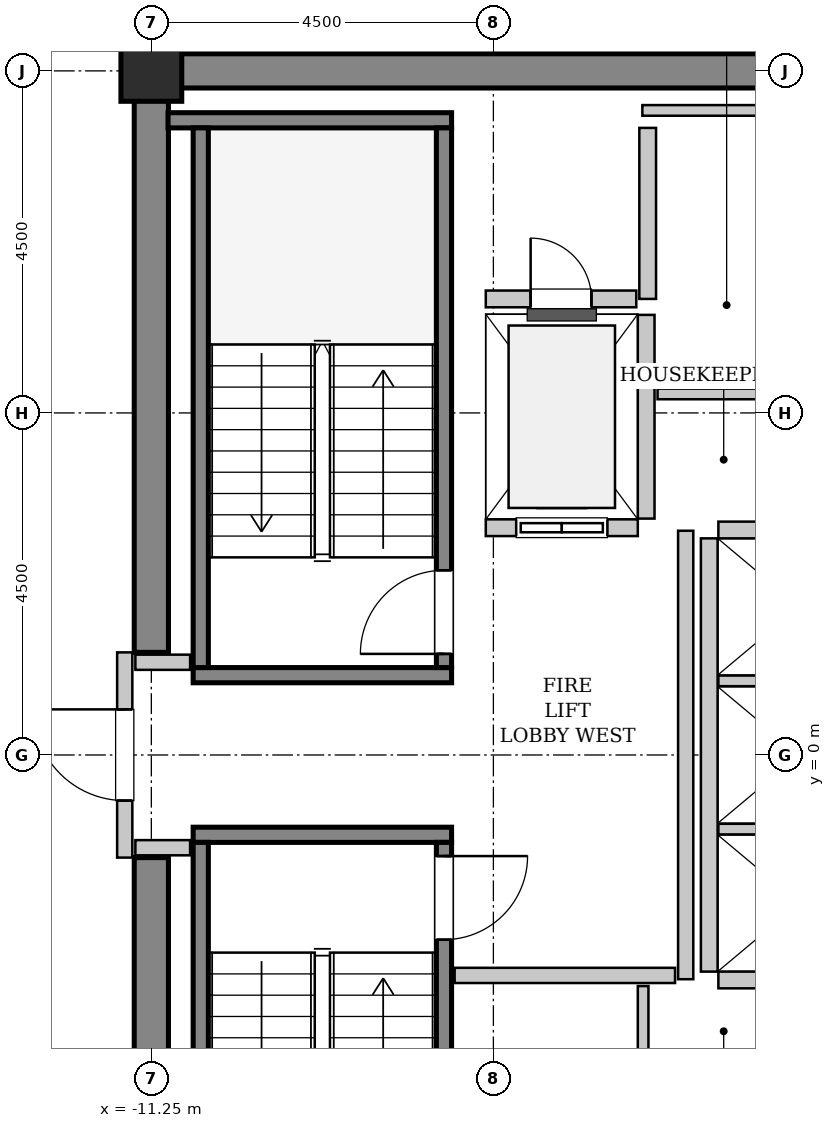
"""IFC4 building model, lengths in metres.
Left out: names, types, materials, properties, quantities, classifications, styles, units other than length and angle.
Written with IfcOpenShell. Run it as: python <this file> out.ifc"""

import sys

from ifc_helpers import new_model, si_unit, direction, frame, frame_2d, origin, origin_2d, place, context, subcontext, project, spatial, rectangle, hollow_rectangle, extrude, source, transform, mapped, element, fill, save


model = new_model("IFC4")
c1 = context("Model", 3, precision=1e-05, world=origin(), true_north=direction((0.0, 1.0)))
c2 = subcontext(c1, "Body", "Model", "MODEL_VIEW")
j1 = project(units=[si_unit("LENGTHUNIT", "METRE"), si_unit("PLANEANGLEUNIT", "RADIAN")], contexts=[c1])
p1 = place(None, origin())
s1 = spatial("IfcSite", under=j1, at=p1, CompositionType="ELEMENT")
p2 = place(p1, origin())
s2 = spatial("IfcBuilding", under=s1, at=p2, CompositionType="ELEMENT")
p3 = place(p2, frame((0.0, 0.0, 252.2)))
s3 = spatial("IfcBuildingStorey", under=s2, at=p3, CompositionType="ELEMENT", Elevation=252.2)
m1 = source(origin(), c2, "Body", "SweptSolid", [
    extrude(rectangle(XDim=9.925, YDim=0.45, at=frame_2d((4.962, 0.0))), origin(), (0.0, 0.0, 1.0), 3.8),
])
p4 = place(p3, frame((-11.475, 9.0, 0.0), z_axis=(0.0, 0.0, 1.0), x_axis=(1.0, 0.0, 0.0)))
e1 = element("IfcWall", 1, at=p4, inside=s3, PredefinedType="SHEAR", context=c2, shape_type="MappedRepresentation", body=[
    mapped(m1, transform((0.0, 0.0, 0.0), x_axis=(1.0, 0.0, 0.0), y_axis=(0.0, 1.0, 0.0), z_axis=(0.0, 0.0, 1.0), scale=1.0)),
])
m2 = source(origin(), c2, "Body", "SweptSolid", [
    extrude(rectangle(XDim=7.425, YDim=0.45, at=frame_2d((3.712, 0.0))), origin(), (0.0, 0.0, 1.0), 3.8),
])
for number, where, z_axis, x_axis in (
    (2, (-11.25, -8.775, 0.0), (0.0, 0.0, 1.0), (0.0, 1.0, 0.0)),
    (3, (-11.25, 1.35, 0.0), (0.0, 0.0, 1.0), (0.0, 1.0, 0.0)),
):
    element("IfcWall", number, at=place(p3, frame(where, z_axis=z_axis, x_axis=x_axis)), inside=s3, PredefinedType="SHEAR", context=c2, shape_type="MappedRepresentation", body=[
        mapped(m2, transform((0.0, 0.0, 0.0), x_axis=(1.0, 0.0, 0.0), y_axis=(0.0, 1.0, 0.0), z_axis=(0.0, 0.0, 1.0), scale=1.0)),
    ])
m3 = source(origin(), c2, "Body", "SweptSolid", [
    extrude(hollow_rectangle(XDim=0.8, YDim=0.8, WallThickness=0.04, InnerFilletRadius=0.04, OuterFilletRadius=0.08, at=origin_2d()), origin(), (0.0, 0.0, 1.0), 3.8),
])
p5 = place(p3, frame((-11.25, 9.0, 0.0), z_axis=(0.0, 0.0, 1.0), x_axis=(1.0, 0.0, 0.0)))
e4 = element("IfcColumn", 4, at=p5, inside=s3, PredefinedType="COLUMN", context=c2, shape_type="MappedRepresentation", body=[
    mapped(m3, transform((0.0, 0.0, 0.0), x_axis=(1.0, 0.0, 0.0), y_axis=(0.0, 1.0, 0.0), z_axis=(0.0, 0.0, 1.0), scale=1.0)),
])
m4 = source(origin(), c2, "Body", "SweptSolid", [
    extrude(rectangle(XDim=3.4, YDim=0.2, at=frame_2d((1.7, 0.0))), origin(), (0.0, 0.0, 1.0), 3.8),
])
p6 = place(p3, frame((-7.3, 1.05, 0.0), z_axis=(0.0, 0.0, 1.0), x_axis=(-1.0, 0.0, 0.0)))
e5 = element("IfcWall", 5, at=p6, inside=s3, PredefinedType="SOLIDWALL", context=c2, shape_type="MappedRepresentation", body=[
    mapped(m4, transform((0.0, 0.0, 0.0), x_axis=(1.0, 0.0, 0.0), y_axis=(0.0, 1.0, 0.0), z_axis=(0.0, 0.0, 1.0), scale=1.0)),
])
m5 = source(origin(), c2, "Body", "SweptSolid", [
    extrude(rectangle(XDim=3.73, YDim=0.2, at=frame_2d((1.865, 0.0))), origin(), (0.0, 0.0, 1.0), 3.8),
])
p7 = place(p3, frame((-7.3, 8.35, 0.0), z_axis=(0.0, 0.0, 1.0), x_axis=(-1.0, 0.0, 0.0)))
e6 = element("IfcWall", 6, at=p7, inside=s3, PredefinedType="SOLIDWALL", context=c2, shape_type="MappedRepresentation", body=[
    mapped(m5, transform((0.0, 0.0, 0.0), x_axis=(1.0, 0.0, 0.0), y_axis=(0.0, 1.0, 0.0), z_axis=(0.0, 0.0, 1.0), scale=1.0)),
])
m6 = source(origin(), c2, "Body", "SweptSolid", [
    extrude(rectangle(XDim=7.1, YDim=0.2, at=frame_2d((3.55, 0.0))), origin(), (0.0, 0.0, 1.0), 3.8),
])
p8 = place(p3, frame((-7.4, 1.15, 0.0), z_axis=(0.0, 0.0, 1.0), x_axis=(0.0, 1.0, 0.0)))
e7 = element("IfcWall", 7, at=p8, inside=s3, PredefinedType="SOLIDWALL", context=c2, shape_type="MappedRepresentation", body=[
    mapped(m6, transform((0.0, 0.0, 0.0), x_axis=(1.0, 0.0, 0.0), y_axis=(0.0, 1.0, 0.0), z_axis=(0.0, 0.0, 1.0), scale=1.0)),
])
p9 = place(p8, frame((0.18, 0.0, 0.0)))
e8 = element("IfcOpeningElement", 8, at=p9, cuts=e7, PredefinedType="OPENING", context=c2, shape_type="SweptSolid", body=[
    extrude(rectangle(XDim=1.1, YDim=2.15, at=frame_2d((0.55, 1.075))), frame((0.0, 0.11, 0.0), z_axis=(0.0, -1.0, 0.0), x_axis=(1.0, 0.0, 0.0)), (0.0, 0.0, 1.0), 0.22),
])
p10 = place(p3, frame((-10.6, 1.15, 0.0), z_axis=(0.0, 0.0, 1.0), x_axis=(0.0, 1.0, 0.0)))
e9 = element("IfcWall", 9, at=p10, inside=s3, PredefinedType="SOLIDWALL", context=c2, shape_type="MappedRepresentation", body=[
    mapped(m6, transform((0.0, 0.0, 0.0), x_axis=(1.0, 0.0, 0.0), y_axis=(0.0, 1.0, 0.0), z_axis=(0.0, 0.0, 1.0), scale=1.0)),
])
p11 = place(p3, frame((-10.7, -1.05, 0.0), z_axis=(0.0, 0.0, 1.0), x_axis=(1.0, 0.0, 0.0)))
e10 = element("IfcWall", 10, at=p11, inside=s3, PredefinedType="SOLIDWALL", context=c2, shape_type="MappedRepresentation", body=[
    mapped(m4, transform((0.0, 0.0, 0.0), x_axis=(1.0, 0.0, 0.0), y_axis=(0.0, 1.0, 0.0), z_axis=(0.0, 0.0, 1.0), scale=1.0)),
])
p12 = place(p3, frame((-10.6, -1.15, 0.0), z_axis=(0.0, 0.0, 1.0), x_axis=(0.0, -1.0, 0.0)))
e11 = element("IfcWall", 11, at=p12, inside=s3, PredefinedType="SOLIDWALL", context=c2, shape_type="MappedRepresentation", body=[
    mapped(m6, transform((0.0, 0.0, 0.0), x_axis=(1.0, 0.0, 0.0), y_axis=(0.0, 1.0, 0.0), z_axis=(0.0, 0.0, 1.0), scale=1.0)),
])
p13 = place(p3, frame((-7.4, -1.15, 0.0), z_axis=(0.0, 0.0, 1.0), x_axis=(0.0, -1.0, 0.0)))
e12 = element("IfcWall", 12, at=p13, inside=s3, PredefinedType="SOLIDWALL", context=c2, shape_type="MappedRepresentation", body=[
    mapped(m6, transform((0.0, 0.0, 0.0), x_axis=(1.0, 0.0, 0.0), y_axis=(0.0, 1.0, 0.0), z_axis=(0.0, 0.0, 1.0), scale=1.0)),
])
p14 = place(p13, frame((0.18, 0.0, 0.0)))
e13 = element("IfcOpeningElement", 13, at=p14, cuts=e12, PredefinedType="OPENING", context=c2, shape_type="SweptSolid", body=[
    extrude(rectangle(XDim=1.1, YDim=2.15, at=frame_2d((0.55, 1.075))), frame((0.0, 0.11, 0.0), z_axis=(0.0, -1.0, 0.0), x_axis=(1.0, 0.0, 0.0)), (0.0, 0.0, 1.0), 0.22),
])
m7 = source(origin(), c2, "Body", "SweptSolid", [
    extrude(rectangle(XDim=2.0, YDim=0.22, at=frame_2d((1.0, 0.0))), origin(), (0.0, 0.0, 1.0), 3.535),
])
p15 = place(p3, frame((-6.85, 2.99, 0.0), z_axis=(0.0, 0.0, 1.0), x_axis=(1.0, 0.0, 0.0)))
e14 = element("IfcWall", 14, at=p15, inside=s3, PredefinedType="SOLIDWALL", context=c2, shape_type="MappedRepresentation", body=[
    mapped(m7, transform((0.0, 0.0, 0.0), x_axis=(1.0, 0.0, 0.0), y_axis=(0.0, 1.0, 0.0), z_axis=(0.0, 0.0, 1.0), scale=1.0)),
])
p16 = place(p15, frame((0.4, 0.0, 0.0)))
e15 = element("IfcOpeningElement", 15, at=p16, cuts=e14, PredefinedType="OPENING", context=c2, shape_type="SweptSolid", body=[
    extrude(rectangle(XDim=1.2, YDim=2.2, at=frame_2d((0.6, 1.1))), frame((0.0, 0.12, 0.0), z_axis=(0.0, -1.0, 0.0), x_axis=(1.0, 0.0, 0.0)), (0.0, 0.0, 1.0), 0.24),
])
m8 = source(origin(), c2, "Body", "SweptSolid", [
    extrude(rectangle(XDim=2.68, YDim=0.22, at=frame_2d((1.34, 0.0))), origin(), (0.0, 0.0, 1.0), 3.535),
])
p17 = place(p3, frame((-4.74, 3.11, 0.0), z_axis=(0.0, 0.0, 1.0), x_axis=(0.0, 1.0, 0.0)))
e16 = element("IfcWall", 16, at=p17, inside=s3, PredefinedType="SOLIDWALL", context=c2, shape_type="MappedRepresentation", body=[
    mapped(m8, transform((0.0, 0.0, 0.0), x_axis=(1.0, 0.0, 0.0), y_axis=(0.0, 1.0, 0.0), z_axis=(0.0, 0.0, 1.0), scale=1.0)),
])
m9 = source(origin(), c2, "Body", "SweptSolid", [
    extrude(rectangle(XDim=5.7, YDim=0.22, at=frame_2d((2.85, 0.0))), origin(), (0.0, 0.0, 1.0), 3.535),
])
p18 = place(p3, frame((-3.91, 2.85, 0.0), z_axis=(0.0, 0.0, 1.0), x_axis=(0.0, -1.0, 0.0)))
e17 = element("IfcWall", 17, at=p18, inside=s3, PredefinedType="SOLIDWALL", context=c2, shape_type="MappedRepresentation", body=[
    mapped(m9, transform((0.0, 0.0, 0.0), x_axis=(1.0, 0.0, 0.0), y_axis=(0.0, 1.0, 0.0), z_axis=(0.0, 0.0, 1.0), scale=1.0)),
])
m10 = source(origin(), c2, "Body", "SweptSolid", [
    extrude(rectangle(XDim=2.13, YDim=0.22, at=frame_2d((1.065, 0.0))), origin(), (0.0, 0.0, 1.0), 3.535),
])
p19 = place(p3, frame((-3.79, -2.96, 0.0), z_axis=(0.0, 0.0, 1.0), x_axis=(1.0, 0.0, 0.0)))
e18 = element("IfcWall", 18, at=p19, inside=s3, PredefinedType="SOLIDWALL", context=c2, shape_type="MappedRepresentation", body=[
    mapped(m10, transform((0.0, 0.0, 0.0), x_axis=(1.0, 0.0, 0.0), y_axis=(0.0, 1.0, 0.0), z_axis=(0.0, 0.0, 1.0), scale=1.0)),
])
m11 = source(origin(), c2, "Body", "SweptSolid", [
    extrude(rectangle(XDim=2.13, YDim=0.14, at=frame_2d((1.065, 0.0))), origin(), (0.0, 0.0, 1.0), 3.535),
])
for number, where, z_axis, x_axis in (
    (19, (-3.79, -0.975, 0.0), (0.0, 0.0, 1.0), (1.0, 0.0, 0.0)),
    (20, (-3.79, 0.975, 0.0), (0.0, 0.0, 1.0), (1.0, 0.0, 0.0)),
):
    element("IfcWall", number, at=place(p3, frame(where, z_axis=z_axis, x_axis=x_axis)), inside=s3, PredefinedType="PARTITIONING", context=c2, shape_type="MappedRepresentation", body=[
        mapped(m11, transform((0.0, 0.0, 0.0), x_axis=(1.0, 0.0, 0.0), y_axis=(0.0, 1.0, 0.0), z_axis=(0.0, 0.0, 1.0), scale=1.0)),
    ])
p20 = place(p3, frame((-1.66, 2.96, 0.0), z_axis=(0.0, 0.0, 1.0), x_axis=(-1.0, 0.0, 0.0)))
e21 = element("IfcWall", 21, at=p20, inside=s3, PredefinedType="SOLIDWALL", context=c2, shape_type="MappedRepresentation", body=[
    mapped(m10, transform((0.0, 0.0, 0.0), x_axis=(1.0, 0.0, 0.0), y_axis=(0.0, 1.0, 0.0), z_axis=(0.0, 0.0, 1.0), scale=1.0)),
])
m12 = source(origin(), c2, "Body", "SweptSolid", [
    extrude(rectangle(XDim=2.25, YDim=0.22, at=frame_2d((1.125, 0.0))), origin(), (0.0, 0.0, 1.0), 3.535),
])
p21 = place(p3, frame((-4.72, 6.0, 0.0), z_axis=(0.0, 0.0, 1.0), x_axis=(0.0, 1.0, 0.0)))
e22 = element("IfcWall", 22, at=p21, inside=s3, PredefinedType="SOLIDWALL", context=c2, shape_type="MappedRepresentation", body=[
    mapped(m12, transform((0.0, 0.0, 0.0), x_axis=(1.0, 0.0, 0.0), y_axis=(0.0, 1.0, 0.0), z_axis=(0.0, 0.0, 1.0), scale=1.0)),
])
m13 = source(origin(), c2, "Body", "SweptSolid", [
    extrude(rectangle(XDim=1.98, YDim=0.22, at=frame_2d((0.99, 0.0))), origin(), (0.0, 0.0, 1.0), 3.535),
])
p22 = place(p3, frame((-6.85, 6.0, 0.0), z_axis=(0.0, 0.0, 1.0), x_axis=(1.0, 0.0, 0.0)))
e23 = element("IfcWall", 23, at=p22, inside=s3, PredefinedType="SOLIDWALL", context=c2, shape_type="MappedRepresentation", body=[
    mapped(m13, transform((0.0, 0.0, 0.0), x_axis=(1.0, 0.0, 0.0), y_axis=(0.0, 1.0, 0.0), z_axis=(0.0, 0.0, 1.0), scale=1.0)),
])
p23 = place(p22, frame((0.59, 0.0, 0.0)))
e24 = element("IfcOpeningElement", 24, at=p23, cuts=e23, PredefinedType="OPENING", context=c2, shape_type="SweptSolid", body=[
    extrude(rectangle(XDim=0.8, YDim=2.0, at=frame_2d((0.4, 1.0))), frame((0.0, 0.12, 0.0), z_axis=(0.0, -1.0, 0.0), x_axis=(1.0, 0.0, 0.0)), (0.0, 0.0, 1.0), 0.24),
])
m14 = source(origin(), c2, "Body", "SweptSolid", [
    extrude(rectangle(XDim=2.7, YDim=0.2, at=frame_2d((1.35, 0.0))), origin(), (0.0, 0.0, 1.0), 2.625),
])
p24 = place(p3, frame((-11.6, -1.35, 0.0), z_axis=(0.0, 0.0, 1.0), x_axis=(0.0, 1.0, 0.0)))
e25 = element("IfcWall", 25, at=p24, inside=s3, PredefinedType="PARTITIONING", context=c2, shape_type="MappedRepresentation", body=[
    mapped(m14, transform((0.0, 0.0, 0.0), x_axis=(1.0, 0.0, 0.0), y_axis=(0.0, 1.0, 0.0), z_axis=(0.0, 0.0, 1.0), scale=1.0)),
])
p25 = place(p24, frame((0.75, 0.0, 0.0)))
e26 = element("IfcOpeningElement", 26, at=p25, cuts=e25, PredefinedType="OPENING", context=c2, shape_type="SweptSolid", body=[
    extrude(rectangle(XDim=1.2, YDim=2.15, at=frame_2d((0.6, 1.075))), frame((0.0, 0.11, 0.0), z_axis=(0.0, -1.0, 0.0), x_axis=(1.0, 0.0, 0.0)), (0.0, 0.0, 1.0), 0.22),
])
m15 = source(origin(), c2, "Body", "SweptSolid", [
    extrude(rectangle(XDim=5.9, YDim=0.2, at=frame_2d((2.95, 0.0))), origin(), (0.0, 0.0, 1.0), 3.535),
])
p26 = place(p3, frame((-4.22, -2.95, 0.0), z_axis=(0.0, 0.0, 1.0), x_axis=(0.0, 1.0, 0.0)))
e27 = element("IfcWall", 27, at=p26, inside=s3, PredefinedType="PARTITIONING", context=c2, shape_type="MappedRepresentation", body=[
    mapped(m15, transform((0.0, 0.0, 0.0), x_axis=(1.0, 0.0, 0.0), y_axis=(0.0, 1.0, 0.0), z_axis=(0.0, 0.0, 1.0), scale=1.0)),
])
m16 = source(origin(), c2, "Body", "SweptSolid", [
    extrude(rectangle(XDim=2.9, YDim=0.2, at=frame_2d((1.45, 0.0))), origin(), (0.0, 0.0, 1.0), 3.535),
])
p27 = place(p3, frame((-7.26, -2.9, 0.0), z_axis=(0.0, 0.0, 1.0), x_axis=(1.0, 0.0, 0.0)))
e28 = element("IfcWall", 28, at=p27, inside=s3, PredefinedType="PARTITIONING", context=c2, shape_type="MappedRepresentation", body=[
    mapped(m16, transform((0.0, 0.0, 0.0), x_axis=(1.0, 0.0, 0.0), y_axis=(0.0, 1.0, 0.0), z_axis=(0.0, 0.0, 1.0), scale=1.0)),
])
m17 = source(origin(), c2, "Body", "SweptSolid", [
    extrude(rectangle(XDim=0.72, YDim=0.2, at=frame_2d((0.36, 0.0))), origin(), (0.0, 0.0, 1.0), 3.535),
])
for number, where, z_axis, x_axis in (
    (29, (-11.46, 1.22, 0.0), (0.0, 0.0, 1.0), (1.0, 0.0, 0.0)),
    (30, (-11.46, -1.22, 0.0), (0.0, 0.0, 1.0), (1.0, 0.0, 0.0)),
):
    element("IfcWall", number, at=place(p3, frame(where, z_axis=z_axis, x_axis=x_axis)), inside=s3, PredefinedType="PARTITIONING", context=c2, shape_type="MappedRepresentation", body=[
        mapped(m17, transform((0.0, 0.0, 0.0), x_axis=(1.0, 0.0, 0.0), y_axis=(0.0, 1.0, 0.0), z_axis=(0.0, 0.0, 1.0), scale=1.0)),
    ])
m18 = source(origin(), c2, "Body", "SweptSolid", [
    extrude(rectangle(XDim=2.95, YDim=0.14, at=frame_2d((1.475, 0.0))), origin(), (0.0, 0.0, 1.0), 3.535),
])
p28 = place(p3, frame((-4.59, 4.75, 0.0), z_axis=(0.0, 0.0, 1.0), x_axis=(1.0, 0.0, 0.0)))
e31 = element("IfcWall", 31, at=p28, inside=s3, PredefinedType="PARTITIONING", context=c2, shape_type="MappedRepresentation", body=[
    mapped(m18, transform((0.0, 0.0, 0.0), x_axis=(1.0, 0.0, 0.0), y_axis=(0.0, 1.0, 0.0), z_axis=(0.0, 0.0, 1.0), scale=1.0)),
])
m19 = source(origin(), c2, "Body", "SweptSolid", [
    extrude(rectangle(XDim=3.15, YDim=0.14, at=frame_2d((1.575, 0.0))), origin(), (0.0, 0.0, 1.0), 3.535),
])
p29 = place(p3, frame((-4.79, 8.48, 0.0), z_axis=(0.0, 0.0, 1.0), x_axis=(1.0, 0.0, 0.0)))
e32 = element("IfcWall", 32, at=p29, inside=s3, PredefinedType="PARTITIONING", context=c2, shape_type="MappedRepresentation", body=[
    mapped(m19, transform((0.0, 0.0, 0.0), x_axis=(1.0, 0.0, 0.0), y_axis=(0.0, 1.0, 0.0), z_axis=(0.0, 0.0, 1.0), scale=1.0)),
])
m20 = source(origin(), c2, "Body", "SweptSolid", [
    extrude(rectangle(XDim=1.1, YDim=0.14, at=frame_2d((0.55, 0.0))), origin(), (0.0, 0.0, 1.0), 3.535),
])
p30 = place(p3, frame((-4.78, -4.14, 0.0), z_axis=(0.0, 0.0, 1.0), x_axis=(0.0, 1.0, 0.0)))
e33 = element("IfcWall", 33, at=p30, inside=s3, PredefinedType="PARTITIONING", context=c2, shape_type="MappedRepresentation", body=[
    mapped(m20, transform((0.0, 0.0, 0.0), x_axis=(1.0, 0.0, 0.0), y_axis=(0.0, 1.0, 0.0), z_axis=(0.0, 0.0, 1.0), scale=1.0)),
])
m21 = source(origin(), c2, "Body", "SweptSolid", [
    extrude(rectangle(XDim=1.1, YDim=2.15, at=frame_2d((0.55, 1.075))), frame((0.0, 0.025, 0.0), z_axis=(0.0, -1.0, 0.0), x_axis=(1.0, 0.0, 0.0)), (0.0, 0.0, 1.0), 0.05),
])
p31 = place(p9, origin())
e34 = element("IfcDoor", 34, at=p31, inside=s3, OperationType="SINGLE_SWING_LEFT", PredefinedType="DOOR", context=c2, shape_type="MappedRepresentation", body=[
    mapped(m21, transform((0.0, 0.0, 0.0), x_axis=(1.0, 0.0, 0.0), y_axis=(0.0, 1.0, 0.0), z_axis=(0.0, 0.0, 1.0), scale=1.0)),
])
fill(e8, e34)
p32 = place(p14, origin())
e35 = element("IfcDoor", 35, at=p32, inside=s3, OperationType="SINGLE_SWING_LEFT", PredefinedType="DOOR", context=c2, shape_type="MappedRepresentation", body=[
    mapped(m21, transform((0.0, 0.0, 0.0), x_axis=(1.0, 0.0, 0.0), y_axis=(0.0, 1.0, 0.0), z_axis=(0.0, 0.0, 1.0), scale=1.0)),
])
fill(e13, e35)
m22 = source(origin(), c2, "Body", "SweptSolid", [
    extrude(rectangle(XDim=1.2, YDim=2.2, at=frame_2d((0.6, 1.1))), frame((0.0, 0.025, 0.0), z_axis=(0.0, -1.0, 0.0), x_axis=(1.0, 0.0, 0.0)), (0.0, 0.0, 1.0), 0.05),
])
p33 = place(p16, origin())
e36 = element("IfcDoor", 36, at=p33, inside=s3, OperationType="SLIDING_TO_LEFT", PredefinedType="DOOR", context=c2, shape_type="MappedRepresentation", body=[
    mapped(m22, transform((0.0, 0.0, 0.0), x_axis=(1.0, 0.0, 0.0), y_axis=(0.0, 1.0, 0.0), z_axis=(0.0, 0.0, 1.0), scale=1.0)),
])
fill(e15, e36)
m23 = source(origin(), c2, "Body", "SweptSolid", [
    extrude(rectangle(XDim=0.8, YDim=2.0, at=frame_2d((0.4, 1.0))), frame((0.0, 0.025, 0.0), z_axis=(0.0, -1.0, 0.0), x_axis=(1.0, 0.0, 0.0)), (0.0, 0.0, 1.0), 0.05),
])
p34 = place(p23, origin())
e37 = element("IfcDoor", 37, at=p34, inside=s3, OperationType="SINGLE_SWING_LEFT", PredefinedType="TRAPDOOR", context=c2, shape_type="MappedRepresentation", body=[
    mapped(m23, transform((0.0, 0.0, 0.0), x_axis=(1.0, 0.0, 0.0), y_axis=(0.0, 1.0, 0.0), z_axis=(0.0, 0.0, 1.0), scale=1.0)),
])
fill(e24, e37)
m24 = source(origin(), c2, "Body", "SweptSolid", [
    extrude(rectangle(XDim=1.2, YDim=2.15, at=frame_2d((0.6, 1.075))), frame((0.0, 0.025, 0.0), z_axis=(0.0, -1.0, 0.0), x_axis=(1.0, 0.0, 0.0)), (0.0, 0.0, 1.0), 0.05),
])
p35 = place(p25, origin())
e38 = element("IfcDoor", 38, at=p35, inside=s3, OperationType="SINGLE_SWING_RIGHT", PredefinedType="DOOR", context=c2, shape_type="MappedRepresentation", body=[
    mapped(m24, transform((0.0, 0.0, 0.0), x_axis=(1.0, 0.0, 0.0), y_axis=(0.0, 1.0, 0.0), z_axis=(0.0, 0.0, 1.0), scale=1.0)),
])
fill(e26, e38)
save(model, sys.argv[1])
